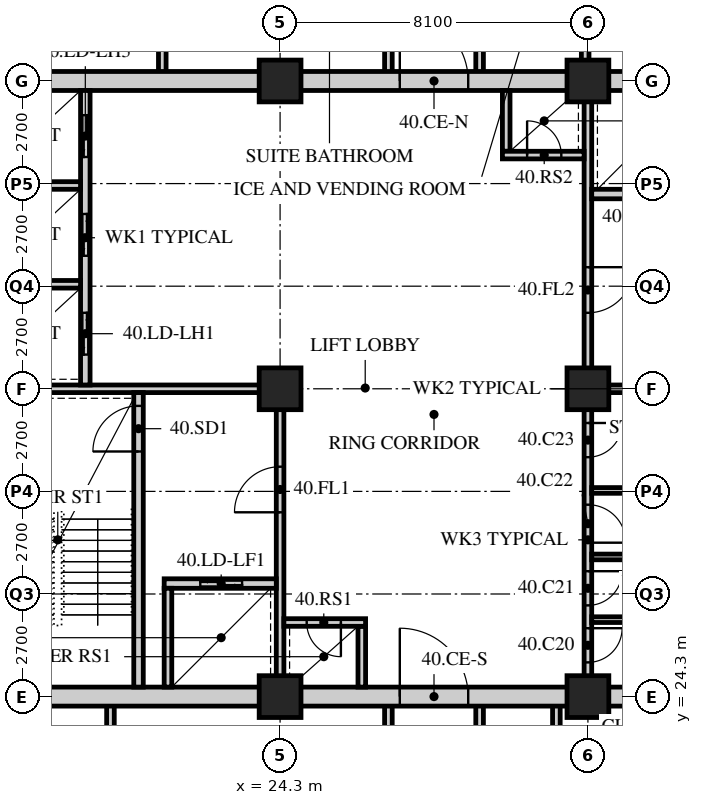
"""IFC4 building model, lengths in metres.
Left out: names, types, materials, properties, quantities, classifications, styles, units other than length and angle.
Written with IfcOpenShell. Run it as: python <this file> out.ifc"""

import sys

from ifc_helpers import new_model, si_unit, direction, frame, frame_2d, origin, origin_2d, place, context, subcontext, project, spatial, rectangle, hollow_rectangle, extrude, element, fill, save


model = new_model("IFC4")
c1 = context("Model", 3, precision=1e-05, world=origin(), true_north=direction((0.0, 1.0)))
c2 = subcontext(c1, "Body", "Model", "MODEL_VIEW")
j1 = project(units=[si_unit("LENGTHUNIT", "METRE"), si_unit("PLANEANGLEUNIT", "RADIAN")], contexts=[c1])
p1 = place(None, origin())
s1 = spatial("IfcSite", under=j1, at=p1, CompositionType="ELEMENT")
p2 = place(p1, origin())
s2 = spatial("IfcBuilding", under=s1, at=p2, CompositionType="ELEMENT")
p3 = place(p2, frame((0.0, 0.0, 154.4)))
s3 = spatial("IfcBuildingStorey", under=s2, at=p3, CompositionType="ELEMENT", Elevation=154.4)
for number, where, z_axis, x_axis in (
    (1, (24.3, 24.3, 0.0), (0.0, 0.0, 1.0), (1.0, 0.0, 0.0)),
    (2, (24.3, 32.4, 0.0), (0.0, 0.0, 1.0), (1.0, 0.0, 0.0)),
    (3, (24.3, 40.5, 0.0), (0.0, 0.0, 1.0), (1.0, 0.0, 0.0)),
    (4, (32.4, 24.3, 0.0), (0.0, 0.0, 1.0), (1.0, 0.0, 0.0)),
    (5, (32.4, 32.4, 0.0), (0.0, 0.0, 1.0), (1.0, 0.0, 0.0)),
    (6, (32.4, 40.5, 0.0), (0.0, 0.0, 1.0), (1.0, 0.0, 0.0)),
):
    element("IfcColumn", number, at=place(p3, frame(where, z_axis=z_axis, x_axis=x_axis)), inside=s3, PredefinedType="COLUMN", context=c2, shape_type="SweptSolid", body=[
        extrude(hollow_rectangle(XDim=1.1, YDim=1.1, WallThickness=0.1, at=origin_2d()), origin(), (0.0, 0.0, 1.0), 3.4),
    ])
for number, where, z_axis, x_axis in (
    (7, (19.836, 19.35, 0.0), (0.0, 0.0, 1.0), (0.0, 1.0, 0.0)),
    (8, (31.57, 19.35, 0.0), (0.0, 0.0, 1.0), (0.0, 1.0, 0.0)),
    (9, (27.15, 19.35, 0.0), (0.0, 0.0, 1.0), (0.0, 1.0, 0.0)),
    (10, (29.55, 19.35, 0.0), (0.0, 0.0, 1.0), (0.0, 1.0, 0.0)),
):
    element("IfcWall", number, at=place(p3, frame(where, z_axis=z_axis, x_axis=x_axis)), inside=s3, PredefinedType="SOLIDWALL", context=c2, shape_type="SweptSolid", body=[
        extrude(rectangle(XDim=4.95, YDim=0.2, at=frame_2d((2.475, 0.0))), origin(), (0.0, 0.0, 1.0), 3.15),
    ])
p4 = place(p3, frame((21.2, 44.1, 0.0), z_axis=(0.0, 0.0, 1.0), x_axis=(0.0, -1.0, 0.0)))
e11 = element("IfcWall", 11, at=p4, inside=s3, PredefinedType="SOLIDWALL", context=c2, shape_type="SweptSolid", body=[
    extrude(rectangle(XDim=3.6, YDim=0.2, at=frame_2d((1.8, 0.0))), origin(), (0.0, 0.0, 1.0), 3.15),
])
p5 = place(p3, frame((32.328, 44.1, 0.0), z_axis=(0.0, 0.0, 1.0), x_axis=(0.0, -1.0, 0.0)))
e12 = element("IfcWall", 12, at=p5, inside=s3, PredefinedType="SOLIDWALL", context=c2, shape_type="SweptSolid", body=[
    extrude(rectangle(XDim=3.6, YDim=0.2, at=frame_2d((1.8, 0.0))), origin(), (0.0, 0.0, 1.0), 2.15),
])
for number, where, z_axis, x_axis in (
    (13, (27.15, 40.5, 0.0), (0.0, 0.0, 1.0), (0.0, 1.0, 0.0)),
    (14, (29.55, 40.5, 0.0), (0.0, 0.0, 1.0), (0.0, 1.0, 0.0)),
):
    element("IfcWall", number, at=place(p3, frame(where, z_axis=z_axis, x_axis=x_axis)), inside=s3, PredefinedType="SOLIDWALL", context=c2, shape_type="SweptSolid", body=[
        extrude(rectangle(XDim=3.6, YDim=0.2, at=frame_2d((1.8, 0.0))), origin(), (0.0, 0.0, 1.0), 3.15),
    ])
p6 = place(p3, frame((15.95, 24.3, 0.0), z_axis=(0.0, 0.0, 1.0), x_axis=(1.0, 0.0, 0.0)))
e15 = element("IfcWall", 15, at=p6, inside=s3, PredefinedType="SOLIDWALL", context=c2, shape_type="SweptSolid", body=[
    extrude(rectangle(XDim=8.35, YDim=0.5, at=frame_2d((4.175, 0.0))), origin(), (0.0, 0.0, 1.0), 2.38),
])
p7 = place(p3, frame((24.3, 24.3, 0.0), z_axis=(0.0, 0.0, 1.0), x_axis=(1.0, 0.0, 0.0)))
e16 = element("IfcWall", 16, at=p7, inside=s3, PredefinedType="SOLIDWALL", context=c2, shape_type="SweptSolid", body=[
    extrude(rectangle(XDim=8.1, YDim=0.5, at=frame_2d((4.05, 0.0))), origin(), (0.0, 0.0, 1.0), 2.5),
])
p8 = place(p7, frame((3.15, 0.0, 0.0)))
e17 = element("IfcOpeningElement", 17, at=p8, cuts=e16, PredefinedType="OPENING", context=c2, shape_type="SweptSolid", body=[
    extrude(rectangle(XDim=1.8, YDim=2.4, at=frame_2d((0.9, 1.2))), frame((0.0, 0.26, 0.0), z_axis=(0.0, -1.0, 0.0), x_axis=(1.0, 0.0, 0.0)), (0.0, 0.0, 1.0), 0.52),
])
for number, where, z_axis, x_axis in (
    (18, (32.4, 24.3, 0.0), (0.0, 0.0, 1.0), (1.0, 0.0, 0.0)),
    (19, (15.95, 40.5, 0.0), (0.0, 0.0, 1.0), (1.0, 0.0, 0.0)),
):
    element("IfcWall", number, at=place(p3, frame(where, z_axis=z_axis, x_axis=x_axis)), inside=s3, PredefinedType="SOLIDWALL", context=c2, shape_type="SweptSolid", body=[
        extrude(rectangle(XDim=8.35, YDim=0.5, at=frame_2d((4.175, 0.0))), origin(), (0.0, 0.0, 1.0), 2.38),
    ])
p9 = place(p3, frame((24.3, 40.5, 0.0), z_axis=(0.0, 0.0, 1.0), x_axis=(1.0, 0.0, 0.0)))
e20 = element("IfcWall", 20, at=p9, inside=s3, PredefinedType="SOLIDWALL", context=c2, shape_type="SweptSolid", body=[
    extrude(rectangle(XDim=8.1, YDim=0.5, at=frame_2d((4.05, 0.0))), origin(), (0.0, 0.0, 1.0), 2.5),
])
p10 = place(p9, frame((3.15, 0.0, 0.0)))
e21 = element("IfcOpeningElement", 21, at=p10, cuts=e20, PredefinedType="OPENING", context=c2, shape_type="SweptSolid", body=[
    extrude(rectangle(XDim=1.8, YDim=2.4, at=frame_2d((0.9, 1.2))), frame((0.0, 0.26, 0.0), z_axis=(0.0, -1.0, 0.0), x_axis=(1.0, 0.0, 0.0)), (0.0, 0.0, 1.0), 0.52),
])
p11 = place(p3, frame((32.4, 40.5, 0.0), z_axis=(0.0, 0.0, 1.0), x_axis=(1.0, 0.0, 0.0)))
e22 = element("IfcWall", 22, at=p11, inside=s3, PredefinedType="SOLIDWALL", context=c2, shape_type="SweptSolid", body=[
    extrude(rectangle(XDim=8.35, YDim=0.5, at=frame_2d((4.175, 0.0))), origin(), (0.0, 0.0, 1.0), 2.38),
])
p12 = place(p3, frame((16.45, 32.4, 0.0), z_axis=(0.0, 0.0, 1.0), x_axis=(1.0, 0.0, 0.0)))
e23 = element("IfcWall", 23, at=p12, inside=s3, PredefinedType="SOLIDWALL", context=c2, shape_type="SweptSolid", body=[
    extrude(rectangle(XDim=7.95, YDim=0.2, at=frame_2d((3.975, 0.0))), origin(), (0.0, 0.0, 1.0), 2.388),
])
p13 = place(p3, frame((24.3, 24.55, 0.0), z_axis=(0.0, 0.0, 1.0), x_axis=(0.0, 1.0, 0.0)))
e24 = element("IfcWall", 24, at=p13, inside=s3, PredefinedType="SOLIDWALL", context=c2, shape_type="SweptSolid", body=[
    extrude(rectangle(XDim=7.75, YDim=0.2, at=frame_2d((3.875, 0.0))), origin(), (0.0, 0.0, 1.0), 2.388),
])
p14 = place(p13, frame((4.6, 0.0, 0.0)))
e25 = element("IfcOpeningElement", 25, at=p14, cuts=e24, PredefinedType="OPENING", context=c2, shape_type="SweptSolid", body=[
    extrude(rectangle(XDim=1.2, YDim=2.1, at=frame_2d((0.6, 1.05))), frame((0.0, 0.11, 0.0), z_axis=(0.0, -1.0, 0.0), x_axis=(1.0, 0.0, 0.0)), (0.0, 0.0, 1.0), 0.22),
])
p15 = place(p3, frame((20.575, 24.55, 0.0), z_axis=(0.0, 0.0, 1.0), x_axis=(0.0, 1.0, 0.0)))
e26 = element("IfcWall", 26, at=p15, inside=s3, PredefinedType="SOLIDWALL", context=c2, shape_type="SweptSolid", body=[
    extrude(rectangle(XDim=7.75, YDim=0.25, at=frame_2d((3.875, 0.0))), origin(), (0.0, 0.0, 1.0), 3.15),
])
p16 = place(p15, frame((6.2, 0.0, 0.0)))
e27 = element("IfcOpeningElement", 27, at=p16, cuts=e26, PredefinedType="OPENING", context=c2, shape_type="SweptSolid", body=[
    extrude(rectangle(XDim=1.2, YDim=2.1, at=frame_2d((0.6, 1.05))), frame((0.0, 0.135, 0.0), z_axis=(0.0, -1.0, 0.0), x_axis=(1.0, 0.0, 0.0)), (0.0, 0.0, 1.0), 0.27),
])
p17 = place(p3, frame((21.25, 27.275, 0.0), z_axis=(0.0, 0.0, 1.0), x_axis=(1.0, 0.0, 0.0)))
e28 = element("IfcWall", 28, at=p17, inside=s3, PredefinedType="SOLIDWALL", context=c2, shape_type="SweptSolid", body=[
    extrude(rectangle(XDim=2.95, YDim=0.25, at=frame_2d((1.475, 0.0))), origin(), (0.0, 0.0, 1.0), 3.15),
])
p18 = place(p17, frame((0.95, 0.0, 0.0)))
e29 = element("IfcOpeningElement", 29, at=p18, cuts=e28, PredefinedType="OPENING", context=c2, shape_type="SweptSolid", body=[
    extrude(rectangle(XDim=1.1, YDim=2.4, at=frame_2d((0.55, 1.2))), frame((0.0, 0.135, 0.0), z_axis=(0.0, -1.0, 0.0), x_axis=(1.0, 0.0, 0.0)), (0.0, 0.0, 1.0), 0.27),
])
p19 = place(p3, frame((21.35, 24.55, 0.0), z_axis=(0.0, 0.0, 1.0), x_axis=(0.0, 1.0, 0.0)))
e30 = element("IfcWall", 30, at=p19, inside=s3, PredefinedType="SOLIDWALL", context=c2, shape_type="SweptSolid", body=[
    extrude(rectangle(XDim=2.6, YDim=0.2, at=frame_2d((1.3, 0.0))), origin(), (0.0, 0.0, 1.0), 3.15),
])
p20 = place(p3, frame((19.175, 32.5, 0.0), z_axis=(0.0, 0.0, 1.0), x_axis=(0.0, 1.0, 0.0)))
e31 = element("IfcWall", 31, at=p20, inside=s3, PredefinedType="SOLIDWALL", context=c2, shape_type="SweptSolid", body=[
    extrude(rectangle(XDim=7.75, YDim=0.25, at=frame_2d((3.875, 0.0))), origin(), (0.0, 0.0, 1.0), 3.15),
])
p21 = place(p20, frame((0.8, 0.0, 0.0)))
e32 = element("IfcOpeningElement", 32, at=p21, cuts=e31, PredefinedType="OPENING", context=c2, shape_type="SweptSolid", body=[
    extrude(rectangle(XDim=1.1, YDim=2.4, at=frame_2d((0.55, 1.2))), frame((0.0, 0.135, 0.0), z_axis=(0.0, -1.0, 0.0), x_axis=(1.0, 0.0, 0.0)), (0.0, 0.0, 1.0), 0.27),
])
p22 = place(p20, frame((3.4, 0.0, 0.0)))
e33 = element("IfcOpeningElement", 33, at=p22, cuts=e31, PredefinedType="OPENING", context=c2, shape_type="SweptSolid", body=[
    extrude(rectangle(XDim=1.1, YDim=2.4, at=frame_2d((0.55, 1.2))), frame((0.0, 0.135, 0.0), z_axis=(0.0, -1.0, 0.0), x_axis=(1.0, 0.0, 0.0)), (0.0, 0.0, 1.0), 0.27),
])
p23 = place(p20, frame((6.0, 0.0, 0.0)))
e34 = element("IfcOpeningElement", 34, at=p23, cuts=e31, PredefinedType="OPENING", context=c2, shape_type="SweptSolid", body=[
    extrude(rectangle(XDim=1.1, YDim=2.4, at=frame_2d((0.55, 1.2))), frame((0.0, 0.135, 0.0), z_axis=(0.0, -1.0, 0.0), x_axis=(1.0, 0.0, 0.0)), (0.0, 0.0, 1.0), 0.27),
])
for number, where, z_axis, x_axis in (
    (35, (16.45, 35.15, 0.0), (0.0, 0.0, 1.0), (1.0, 0.0, 0.0)),
    (36, (16.45, 37.75, 0.0), (0.0, 0.0, 1.0), (1.0, 0.0, 0.0)),
):
    element("IfcWall", number, at=place(p3, frame(where, z_axis=z_axis, x_axis=x_axis)), inside=s3, PredefinedType="SOLIDWALL", context=c2, shape_type="SweptSolid", body=[
        extrude(rectangle(XDim=2.6, YDim=0.2, at=frame_2d((1.3, 0.0))), origin(), (0.0, 0.0, 1.0), 3.15),
    ])
p24 = place(p3, frame((26.45, 24.55, 0.0), z_axis=(0.0, 0.0, 1.0), x_axis=(0.0, 1.0, 0.0)))
e37 = element("IfcWall", 37, at=p24, inside=s3, PredefinedType="SOLIDWALL", context=c2, shape_type="SweptSolid", body=[
    extrude(rectangle(XDim=1.6, YDim=0.2, at=frame_2d((0.8, 0.0))), origin(), (0.0, 0.0, 1.0), 3.15),
])
p25 = place(p3, frame((24.4, 26.25, 0.0), z_axis=(0.0, 0.0, 1.0), x_axis=(1.0, 0.0, 0.0)))
e38 = element("IfcWall", 38, at=p25, inside=s3, PredefinedType="SOLIDWALL", context=c2, shape_type="SweptSolid", body=[
    extrude(rectangle(XDim=2.15, YDim=0.2, at=frame_2d((1.075, 0.0))), origin(), (0.0, 0.0, 1.0), 3.15),
])
p26 = place(p25, frame((0.6, 0.0, 0.0)))
e39 = element("IfcOpeningElement", 39, at=p26, cuts=e38, PredefinedType="OPENING", context=c2, shape_type="SweptSolid", body=[
    extrude(rectangle(XDim=0.9, YDim=2.1, at=frame_2d((0.45, 1.05))), frame((0.0, 0.11, 0.0), z_axis=(0.0, -1.0, 0.0), x_axis=(1.0, 0.0, 0.0)), (0.0, 0.0, 1.0), 0.22),
])
p27 = place(p3, frame((32.3, 32.4, 0.0), z_axis=(0.0, 0.0, 1.0), x_axis=(1.0, 0.0, 0.0)))
e40 = element("IfcWall", 40, at=p27, inside=s3, PredefinedType="SOLIDWALL", context=c2, shape_type="SweptSolid", body=[
    extrude(rectangle(XDim=7.95, YDim=0.2, at=frame_2d((3.975, 0.0))), origin(), (0.0, 0.0, 1.0), 2.388),
])
p28 = place(p3, frame((32.4, 32.5, 0.0), z_axis=(0.0, 0.0, 1.0), x_axis=(0.0, 1.0, 0.0)))
e41 = element("IfcWall", 41, at=p28, inside=s3, PredefinedType="SOLIDWALL", context=c2, shape_type="SweptSolid", body=[
    extrude(rectangle(XDim=7.75, YDim=0.2, at=frame_2d((3.875, 0.0))), origin(), (0.0, 0.0, 1.0), 2.388),
])
p29 = place(p28, frame((1.9, 0.0, 0.0)))
e42 = element("IfcOpeningElement", 42, at=p29, cuts=e41, PredefinedType="OPENING", context=c2, shape_type="SweptSolid", body=[
    extrude(rectangle(XDim=1.2, YDim=2.1, at=frame_2d((0.6, 1.05))), frame((0.0, 0.11, 0.0), z_axis=(0.0, -1.0, 0.0), x_axis=(1.0, 0.0, 0.0)), (0.0, 0.0, 1.0), 0.22),
])
p30 = place(p3, frame((32.5, 37.525, 0.0), z_axis=(0.0, 0.0, 1.0), x_axis=(1.0, 0.0, 0.0)))
e43 = element("IfcWall", 43, at=p30, inside=s3, PredefinedType="SOLIDWALL", context=c2, shape_type="SweptSolid", body=[
    extrude(rectangle(XDim=2.95, YDim=0.25, at=frame_2d((1.475, 0.0))), origin(), (0.0, 0.0, 1.0), 3.15),
])
p31 = place(p30, frame((0.9, 0.0, 0.0)))
e44 = element("IfcOpeningElement", 44, at=p31, cuts=e43, PredefinedType="OPENING", context=c2, shape_type="SweptSolid", body=[
    extrude(rectangle(XDim=1.1, YDim=2.4, at=frame_2d((0.55, 1.2))), frame((0.0, 0.135, 0.0), z_axis=(0.0, -1.0, 0.0), x_axis=(1.0, 0.0, 0.0)), (0.0, 0.0, 1.0), 0.27),
])
p32 = place(p3, frame((30.25, 38.65, 0.0), z_axis=(0.0, 0.0, 1.0), x_axis=(0.0, 1.0, 0.0)))
e45 = element("IfcWall", 45, at=p32, inside=s3, PredefinedType="SOLIDWALL", context=c2, shape_type="SweptSolid", body=[
    extrude(rectangle(XDim=1.6, YDim=0.2, at=frame_2d((0.8, 0.0))), origin(), (0.0, 0.0, 1.0), 3.15),
])
p33 = place(p3, frame((30.15, 38.55, 0.0), z_axis=(0.0, 0.0, 1.0), x_axis=(1.0, 0.0, 0.0)))
e46 = element("IfcWall", 46, at=p33, inside=s3, PredefinedType="SOLIDWALL", context=c2, shape_type="SweptSolid", body=[
    extrude(rectangle(XDim=2.15, YDim=0.2, at=frame_2d((1.075, 0.0))), origin(), (0.0, 0.0, 1.0), 3.15),
])
p34 = place(p33, frame((0.65, 0.0, 0.0)))
e47 = element("IfcOpeningElement", 47, at=p34, cuts=e46, PredefinedType="OPENING", context=c2, shape_type="SweptSolid", body=[
    extrude(rectangle(XDim=0.9, YDim=2.1, at=frame_2d((0.45, 1.05))), frame((0.0, 0.11, 0.0), z_axis=(0.0, -1.0, 0.0), x_axis=(1.0, 0.0, 0.0)), (0.0, 0.0, 1.0), 0.22),
])
p35 = place(p3, frame((32.4, 24.55, 0.0), z_axis=(0.0, 0.0, 1.0), x_axis=(0.0, 1.0, 0.0)))
e48 = element("IfcWall", 48, at=p35, inside=s3, PredefinedType="PARTITIONING", context=c2, shape_type="SweptSolid", body=[
    extrude(rectangle(XDim=7.75, YDim=0.2, at=frame_2d((3.875, 0.0))), origin(), (0.0, 0.0, 1.0), 2.388),
])
p36 = place(p35, frame((0.65, 0.0, 0.0)))
e49 = element("IfcOpeningElement", 49, at=p36, cuts=e48, PredefinedType="OPENING", context=c2, shape_type="SweptSolid", body=[
    extrude(rectangle(XDim=0.9, YDim=2.1, at=frame_2d((0.45, 1.05))), frame((0.0, 0.11, 0.0), z_axis=(0.0, -1.0, 0.0), x_axis=(1.0, 0.0, 0.0)), (0.0, 0.0, 1.0), 0.22),
])
p37 = place(p35, frame((2.15, 0.0, 0.0)))
e50 = element("IfcOpeningElement", 50, at=p37, cuts=e48, PredefinedType="OPENING", context=c2, shape_type="SweptSolid", body=[
    extrude(rectangle(XDim=0.9, YDim=2.1, at=frame_2d((0.45, 1.05))), frame((0.0, 0.11, 0.0), z_axis=(0.0, -1.0, 0.0), x_axis=(1.0, 0.0, 0.0)), (0.0, 0.0, 1.0), 0.22),
])
p38 = place(p35, frame((3.8, 0.0, 0.0)))
e51 = element("IfcOpeningElement", 51, at=p38, cuts=e48, PredefinedType="OPENING", context=c2, shape_type="SweptSolid", body=[
    extrude(rectangle(XDim=1.0, YDim=2.1, at=frame_2d((0.5, 1.05))), frame((0.0, 0.11, 0.0), z_axis=(0.0, -1.0, 0.0), x_axis=(1.0, 0.0, 0.0)), (0.0, 0.0, 1.0), 0.22),
])
p39 = place(p35, frame((6.05, 0.0, 0.0)))
e52 = element("IfcOpeningElement", 52, at=p39, cuts=e48, PredefinedType="OPENING", context=c2, shape_type="SweptSolid", body=[
    extrude(rectangle(XDim=0.9, YDim=2.1, at=frame_2d((0.45, 1.05))), frame((0.0, 0.11, 0.0), z_axis=(0.0, -1.0, 0.0), x_axis=(1.0, 0.0, 0.0)), (0.0, 0.0, 1.0), 0.22),
])
for number, where, z_axis, x_axis in (
    (53, (32.5, 26.325, 0.0), (0.0, 0.0, 1.0), (1.0, 0.0, 0.0)),
    (54, (32.5, 27.975, 0.0), (0.0, 0.0, 1.0), (1.0, 0.0, 0.0)),
):
    element("IfcWall", number, at=place(p3, frame(where, z_axis=z_axis, x_axis=x_axis)), inside=s3, PredefinedType="PARTITIONING", context=c2, shape_type="SweptSolid", body=[
        extrude(rectangle(XDim=2.55, YDim=0.15, at=frame_2d((1.275, 0.0))), origin(), (0.0, 0.0, 1.0), 3.15),
    ])
p40 = place(p3, frame((32.5, 29.725, 0.0), z_axis=(0.0, 0.0, 1.0), x_axis=(1.0, 0.0, 0.0)))
e55 = element("IfcWall", 55, at=p40, inside=s3, PredefinedType="PARTITIONING", context=c2, shape_type="SweptSolid", body=[
    extrude(rectangle(XDim=2.4, YDim=0.15, at=frame_2d((1.2, 0.0))), origin(), (0.0, 0.0, 1.0), 3.15),
])
p41 = place(p36, origin())
e56 = element("IfcDoor", 56, at=p41, inside=s3, OperationType="SINGLE_SWING_LEFT", PredefinedType="DOOR", context=c2, shape_type="SweptSolid", body=[
    extrude(rectangle(XDim=0.9, YDim=2.1, at=frame_2d((0.45, 1.05))), frame((0.0, 0.025, 0.0), z_axis=(0.0, -1.0, 0.0), x_axis=(1.0, 0.0, 0.0)), (0.0, 0.0, 1.0), 0.05),
])
fill(e49, e56)
p42 = place(p37, origin())
e57 = element("IfcDoor", 57, at=p42, inside=s3, OperationType="SINGLE_SWING_LEFT", PredefinedType="DOOR", context=c2, shape_type="SweptSolid", body=[
    extrude(rectangle(XDim=0.9, YDim=2.1, at=frame_2d((0.45, 1.05))), frame((0.0, 0.025, 0.0), z_axis=(0.0, -1.0, 0.0), x_axis=(1.0, 0.0, 0.0)), (0.0, 0.0, 1.0), 0.05),
])
fill(e50, e57)
p43 = place(p38, origin())
e58 = element("IfcDoor", 58, at=p43, inside=s3, OperationType="SINGLE_SWING_RIGHT", PredefinedType="DOOR", context=c2, shape_type="SweptSolid", body=[
    extrude(rectangle(XDim=1.0, YDim=2.1, at=frame_2d((0.5, 1.05))), frame((0.0, 0.025, 0.0), z_axis=(0.0, -1.0, 0.0), x_axis=(1.0, 0.0, 0.0)), (0.0, 0.0, 1.0), 0.05),
])
fill(e51, e58)
p44 = place(p39, origin())
e59 = element("IfcDoor", 59, at=p44, inside=s3, OperationType="SINGLE_SWING_LEFT", PredefinedType="DOOR", context=c2, shape_type="SweptSolid", body=[
    extrude(rectangle(XDim=0.9, YDim=2.1, at=frame_2d((0.45, 1.05))), frame((0.0, 0.025, 0.0), z_axis=(0.0, -1.0, 0.0), x_axis=(1.0, 0.0, 0.0)), (0.0, 0.0, 1.0), 0.05),
])
fill(e52, e59)
p45 = place(p16, origin())
e60 = element("IfcDoor", 60, at=p45, inside=s3, OperationType="SINGLE_SWING_LEFT", PredefinedType="DOOR", context=c2, shape_type="SweptSolid", body=[
    extrude(rectangle(XDim=1.2, YDim=2.1, at=frame_2d((0.6, 1.05))), frame((0.0, 0.025, 0.0), z_axis=(0.0, -1.0, 0.0), x_axis=(1.0, 0.0, 0.0)), (0.0, 0.0, 1.0), 0.05),
])
fill(e27, e60)
p46 = place(p14, origin())
e61 = element("IfcDoor", 61, at=p46, inside=s3, OperationType="SINGLE_SWING_LEFT", PredefinedType="DOOR", context=c2, shape_type="SweptSolid", body=[
    extrude(rectangle(XDim=1.2, YDim=2.1, at=frame_2d((0.6, 1.05))), frame((0.0, 0.025, 0.0), z_axis=(0.0, -1.0, 0.0), x_axis=(1.0, 0.0, 0.0)), (0.0, 0.0, 1.0), 0.05),
])
fill(e25, e61)
p47 = place(p26, origin())
e62 = element("IfcDoor", 62, at=p47, inside=s3, OperationType="SINGLE_SWING_LEFT", PredefinedType="DOOR", context=c2, shape_type="SweptSolid", body=[
    extrude(rectangle(XDim=0.9, YDim=2.1, at=frame_2d((0.45, 1.05))), frame((0.0, 0.025, 0.0), z_axis=(0.0, -1.0, 0.0), x_axis=(1.0, 0.0, 0.0)), (0.0, 0.0, 1.0), 0.05),
])
fill(e39, e62)
p48 = place(p29, origin())
e63 = element("IfcDoor", 63, at=p48, inside=s3, OperationType="SINGLE_SWING_LEFT", PredefinedType="DOOR", context=c2, shape_type="SweptSolid", body=[
    extrude(rectangle(XDim=1.2, YDim=2.1, at=frame_2d((0.6, 1.05))), frame((0.0, 0.025, 0.0), z_axis=(0.0, -1.0, 0.0), x_axis=(1.0, 0.0, 0.0)), (0.0, 0.0, 1.0), 0.05),
])
fill(e42, e63)
p49 = place(p34, origin())
e64 = element("IfcDoor", 64, at=p49, inside=s3, OperationType="SINGLE_SWING_LEFT", PredefinedType="DOOR", context=c2, shape_type="SweptSolid", body=[
    extrude(rectangle(XDim=0.9, YDim=2.1, at=frame_2d((0.45, 1.05))), frame((0.0, 0.025, 0.0), z_axis=(0.0, -1.0, 0.0), x_axis=(1.0, 0.0, 0.0)), (0.0, 0.0, 1.0), 0.05),
])
fill(e47, e64)
p50 = place(p21, origin())
e65 = element("IfcDoor", 65, at=p50, inside=s3, OperationType="DOUBLE_DOOR_SLIDING", PredefinedType="DOOR", context=c2, shape_type="SweptSolid", body=[
    extrude(rectangle(XDim=1.1, YDim=2.4, at=frame_2d((0.55, 1.2))), frame((0.0, 0.025, 0.0), z_axis=(0.0, -1.0, 0.0), x_axis=(1.0, 0.0, 0.0)), (0.0, 0.0, 1.0), 0.05),
])
fill(e32, e65)
p51 = place(p22, origin())
e66 = element("IfcDoor", 66, at=p51, inside=s3, OperationType="DOUBLE_DOOR_SLIDING", PredefinedType="DOOR", context=c2, shape_type="SweptSolid", body=[
    extrude(rectangle(XDim=1.1, YDim=2.4, at=frame_2d((0.55, 1.2))), frame((0.0, 0.025, 0.0), z_axis=(0.0, -1.0, 0.0), x_axis=(1.0, 0.0, 0.0)), (0.0, 0.0, 1.0), 0.05),
])
fill(e33, e66)
p52 = place(p23, origin())
e67 = element("IfcDoor", 67, at=p52, inside=s3, OperationType="DOUBLE_DOOR_SLIDING", PredefinedType="DOOR", context=c2, shape_type="SweptSolid", body=[
    extrude(rectangle(XDim=1.1, YDim=2.4, at=frame_2d((0.55, 1.2))), frame((0.0, 0.025, 0.0), z_axis=(0.0, -1.0, 0.0), x_axis=(1.0, 0.0, 0.0)), (0.0, 0.0, 1.0), 0.05),
])
fill(e34, e67)
p53 = place(p18, origin())
e68 = element("IfcDoor", 68, at=p53, inside=s3, OperationType="DOUBLE_DOOR_SLIDING", PredefinedType="DOOR", context=c2, shape_type="SweptSolid", body=[
    extrude(rectangle(XDim=1.1, YDim=2.4, at=frame_2d((0.55, 1.2))), frame((0.0, 0.025, 0.0), z_axis=(0.0, -1.0, 0.0), x_axis=(1.0, 0.0, 0.0)), (0.0, 0.0, 1.0), 0.05),
])
fill(e29, e68)
p54 = place(p8, origin())
e69 = element("IfcDoor", 69, at=p54, inside=s3, OperationType="DOUBLE_DOOR_SINGLE_SWING", PredefinedType="DOOR", context=c2, shape_type="SweptSolid", body=[
    extrude(rectangle(XDim=1.8, YDim=2.4, at=frame_2d((0.9, 1.2))), frame((0.0, 0.025, 0.0), z_axis=(0.0, -1.0, 0.0), x_axis=(1.0, 0.0, 0.0)), (0.0, 0.0, 1.0), 0.05),
])
fill(e17, e69)
p55 = place(p10, origin())
e70 = element("IfcDoor", 70, at=p55, inside=s3, OperationType="DOUBLE_DOOR_SINGLE_SWING", PredefinedType="DOOR", context=c2, shape_type="SweptSolid", body=[
    extrude(rectangle(XDim=1.8, YDim=2.4, at=frame_2d((0.9, 1.2))), frame((0.0, 0.025, 0.0), z_axis=(0.0, -1.0, 0.0), x_axis=(1.0, 0.0, 0.0)), (0.0, 0.0, 1.0), 0.05),
])
fill(e21, e70)
save(model, sys.argv[1])
